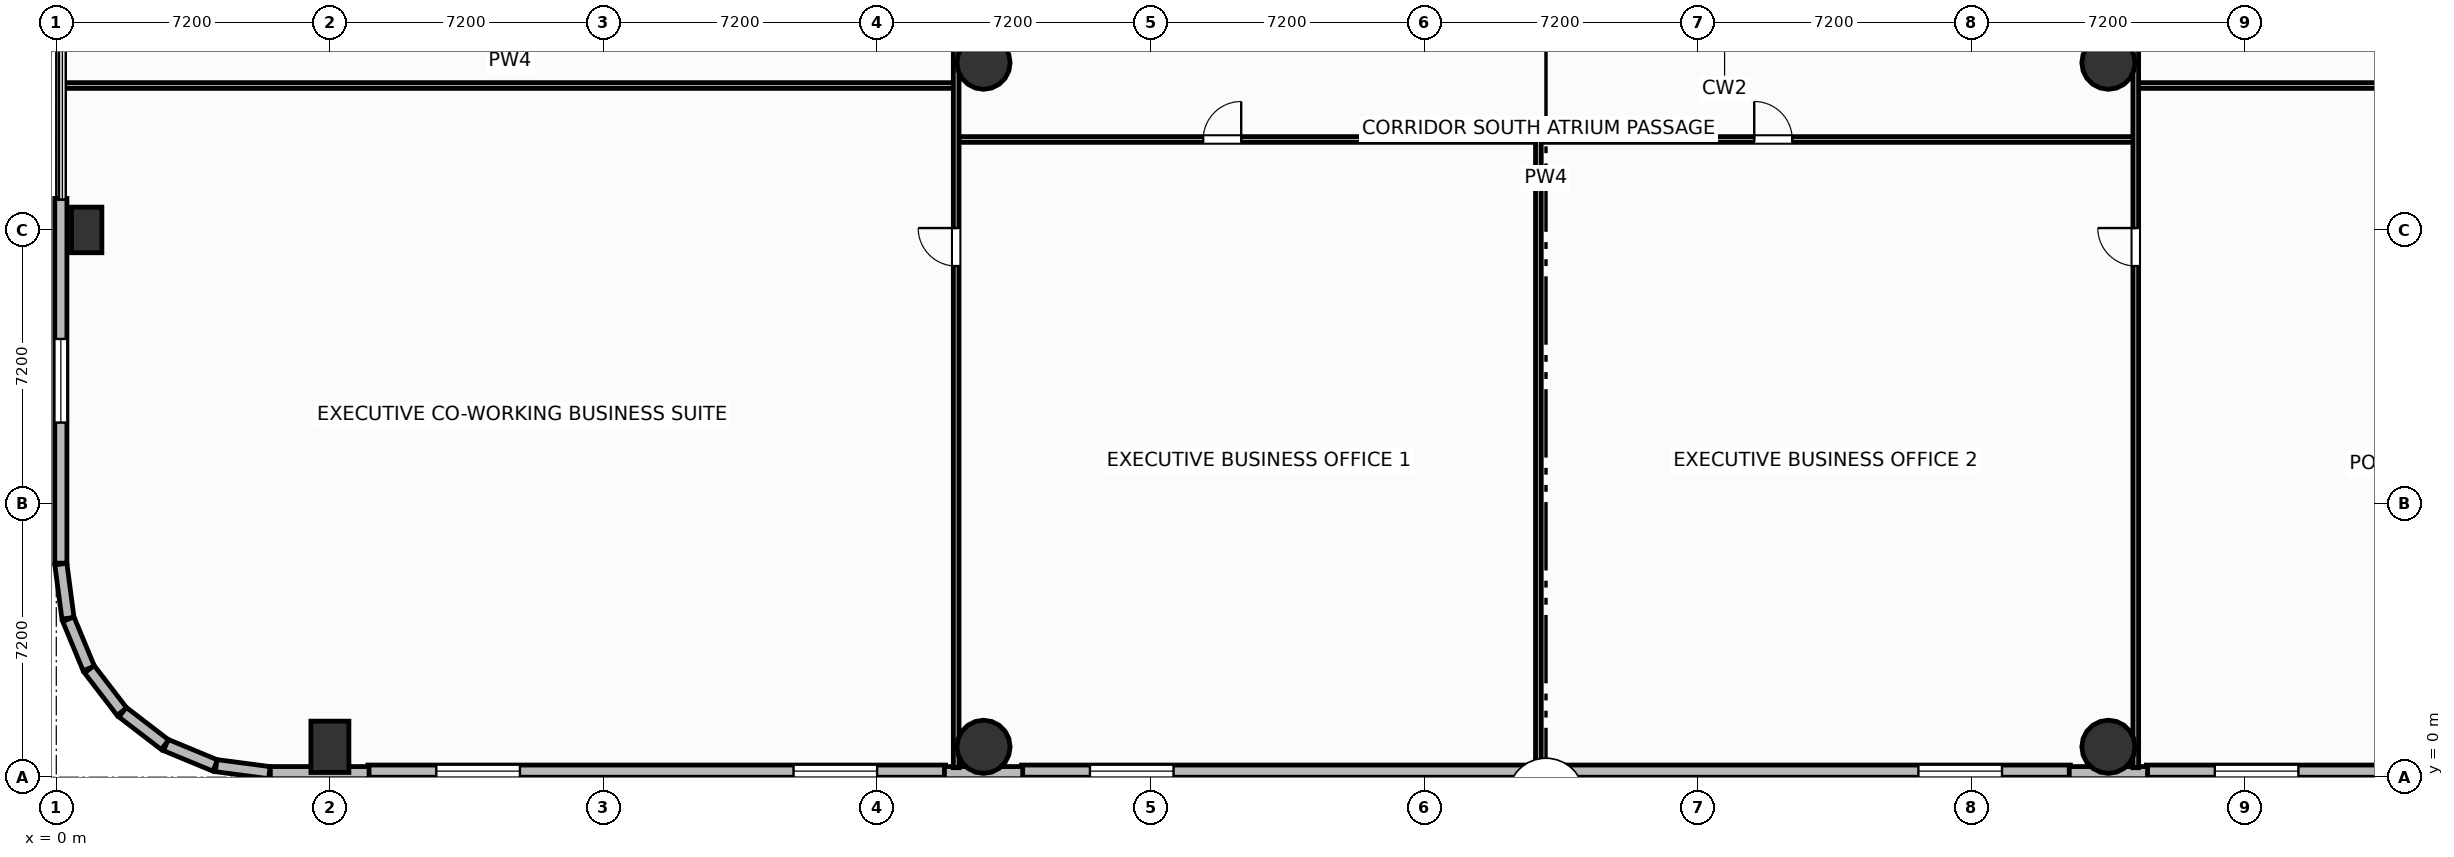
"""IFC4 building model, lengths in metres.
Left out: names, types, materials, properties, quantities, classifications, styles, units other than length and angle.
Written with IfcOpenShell. Run it as: python <this file> out.ifc"""

import sys

from ifc_helpers import new_model, si_unit, direction, frame, frame_2d, origin, origin_2d, place, context, subcontext, project, spatial, rectangle, circle, extrude, element, fill, save


model = new_model("IFC4")
c1 = context("Model", 3, precision=1e-05, world=origin(), true_north=direction((0.0, 1.0)))
c2 = subcontext(c1, "Body", "Model", "MODEL_VIEW")
j1 = project(units=[si_unit("LENGTHUNIT", "METRE"), si_unit("PLANEANGLEUNIT", "RADIAN")], contexts=[c1])
p1 = place(None, origin())
s1 = spatial("IfcSite", under=j1, at=p1, CompositionType="ELEMENT")
p2 = place(p1, origin())
s2 = spatial("IfcBuilding", under=s1, at=p2, CompositionType="ELEMENT")
p3 = place(p2, frame((0.0, 0.0, 21.6)))
s3 = spatial("IfcBuildingStorey", under=s2, at=p3, CompositionType="ELEMENT", Elevation=21.6)
p4 = place(p3, frame((7.2, 0.8, 0.0), z_axis=(0.0, 0.0, 1.0), x_axis=(1.0, 0.0, 0.0)))
e1 = element("IfcColumn", 1, at=p4, inside=s3, PredefinedType="COLUMN", context=c2, shape_type="SweptSolid", body=[
    extrude(rectangle(XDim=1.0, YDim=1.35, at=origin_2d()), origin(), (0.0, 0.0, 1.0), 5.4),
])
for number, where, z_axis, x_axis in (
    (2, (24.4, 0.8, 0.0), (0.0, 0.0, 1.0), (1.0, 0.0, 0.0)),
    (3, (54.0, 0.8, 0.0), (0.0, 0.0, 1.0), (1.0, 0.0, 0.0)),
    (4, (24.4, 18.8, 0.0), (0.0, 0.0, 1.0), (1.0, 0.0, 0.0)),
    (5, (54.0, 18.8, 0.0), (0.0, 0.0, 1.0), (1.0, 0.0, 0.0)),
):
    element("IfcColumn", number, at=place(p3, frame(where, z_axis=z_axis, x_axis=x_axis)), inside=s3, PredefinedType="COLUMN", context=c2, shape_type="SweptSolid", body=[
        extrude(circle(Radius=0.7, at=origin_2d()), origin(), (0.0, 0.0, 1.0), 5.4),
    ])
p5 = place(p3, frame((0.8, 14.4, 0.0), z_axis=(0.0, 0.0, 1.0), x_axis=(1.0, 0.0, 0.0)))
e6 = element("IfcColumn", 6, at=p5, inside=s3, PredefinedType="PILASTER", context=c2, shape_type="SweptSolid", body=[
    extrude(rectangle(XDim=0.8, YDim=1.2, at=origin_2d()), origin(), (0.0, 0.0, 1.0), 5.4),
])
p6 = place(p3, frame((23.4, 0.16, 0.0), z_axis=(0.0, 0.0, 1.0), x_axis=(-1.0, 0.0, 0.0)))
e7 = element("IfcWall", 7, at=p6, inside=s3, PredefinedType="SOLIDWALL", context=c2, shape_type="SweptSolid", body=[
    extrude(rectangle(XDim=15.2, YDim=0.32, at=frame_2d((7.6, 0.0))), origin(), (0.0, 0.0, 1.0), 4.1),
])
p7 = place(p6, frame((1.8, 0.0, 0.8)))
e8 = element("IfcOpeningElement", 8, at=p7, cuts=e7, PredefinedType="OPENING", context=c2, shape_type="SweptSolid", body=[
    extrude(rectangle(XDim=2.2, YDim=1.11, at=frame_2d((1.1, 0.555))), frame((0.0, 0.17, 0.0), z_axis=(0.0, -1.0, 0.0), x_axis=(1.0, 0.0, 0.0)), (0.0, 0.0, 1.0), 0.34),
])
p8 = place(p6, frame((11.2, 0.0, 0.8)))
e9 = element("IfcOpeningElement", 9, at=p8, cuts=e7, PredefinedType="OPENING", context=c2, shape_type="SweptSolid", body=[
    extrude(rectangle(XDim=2.2, YDim=1.11, at=frame_2d((1.1, 0.555))), frame((0.0, 0.17, 0.0), z_axis=(0.0, -1.0, 0.0), x_axis=(1.0, 0.0, 0.0)), (0.0, 0.0, 1.0), 0.34),
])
p9 = place(p3, frame((53.0, 0.16, 0.0), z_axis=(0.0, 0.0, 1.0), x_axis=(-1.0, 0.0, 0.0)))
e10 = element("IfcWall", 10, at=p9, inside=s3, PredefinedType="SOLIDWALL", context=c2, shape_type="SweptSolid", body=[
    extrude(rectangle(XDim=27.6, YDim=0.32, at=frame_2d((13.8, 0.0))), origin(), (0.0, 0.0, 1.0), 4.1),
])
p10 = place(p9, frame((1.8, 0.0, 0.8)))
e11 = element("IfcOpeningElement", 11, at=p10, cuts=e10, PredefinedType="OPENING", context=c2, shape_type="SweptSolid", body=[
    extrude(rectangle(XDim=2.2, YDim=1.11, at=frame_2d((1.1, 0.555))), frame((0.0, 0.17, 0.0), z_axis=(0.0, -1.0, 0.0), x_axis=(1.0, 0.0, 0.0)), (0.0, 0.0, 1.0), 0.34),
])
p11 = place(p9, frame((23.6, 0.0, 0.8)))
e12 = element("IfcOpeningElement", 12, at=p11, cuts=e10, PredefinedType="OPENING", context=c2, shape_type="SweptSolid", body=[
    extrude(rectangle(XDim=2.2, YDim=1.11, at=frame_2d((1.1, 0.555))), frame((0.0, 0.17, 0.0), z_axis=(0.0, -1.0, 0.0), x_axis=(1.0, 0.0, 0.0)), (0.0, 0.0, 1.0), 0.34),
])
p12 = place(p3, frame((70.2, 0.16, 0.0), z_axis=(0.0, 0.0, 1.0), x_axis=(-1.0, 0.0, 0.0)))
e13 = element("IfcWall", 13, at=p12, inside=s3, PredefinedType="SOLIDWALL", context=c2, shape_type="SweptSolid", body=[
    extrude(rectangle(XDim=15.2, YDim=0.32, at=frame_2d((7.6, 0.0))), origin(), (0.0, 0.0, 1.0), 4.1),
])
p13 = place(p12, frame((1.8, 0.0, 0.8)))
e14 = element("IfcOpeningElement", 14, at=p13, cuts=e13, PredefinedType="OPENING", context=c2, shape_type="SweptSolid", body=[
    extrude(rectangle(XDim=2.2, YDim=1.11, at=frame_2d((1.1, 0.555))), frame((0.0, 0.17, 0.0), z_axis=(0.0, -1.0, 0.0), x_axis=(1.0, 0.0, 0.0)), (0.0, 0.0, 1.0), 0.34),
])
p14 = place(p12, frame((11.2, 0.0, 0.8)))
e15 = element("IfcOpeningElement", 15, at=p14, cuts=e13, PredefinedType="OPENING", context=c2, shape_type="SweptSolid", body=[
    extrude(rectangle(XDim=2.2, YDim=1.11, at=frame_2d((1.1, 0.555))), frame((0.0, 0.17, 0.0), z_axis=(0.0, -1.0, 0.0), x_axis=(1.0, 0.0, 0.0)), (0.0, 0.0, 1.0), 0.34),
])
p15 = place(p3, frame((0.12, 5.608, 0.0), z_axis=(0.0, 0.0, 1.0), x_axis=(0.130362303307, -0.991466423978, 0.0)))
e16 = element("IfcWall", 16, at=p15, inside=s3, PredefinedType="SOLIDWALL", context=c2, shape_type="SweptSolid", body=[
    extrude(rectangle(XDim=1.438, YDim=0.32, at=frame_2d((0.719, 0.0))), origin(), (0.0, 0.0, 1.0), 4.1),
])
p16 = place(p3, frame((0.317, 4.159, 0.0), z_axis=(0.0, 0.0, 1.0), x_axis=(0.382628033724, -0.923902477434, 0.0)))
e17 = element("IfcWall", 17, at=p16, inside=s3, PredefinedType="SOLIDWALL", context=c2, shape_type="SweptSolid", body=[
    extrude(rectangle(XDim=1.405, YDim=0.32, at=frame_2d((0.703, 0.0))), origin(), (0.0, 0.0, 1.0), 4.1),
])
p17 = place(p3, frame((0.87, 2.841, 0.0), z_axis=(0.0, 0.0, 1.0), x_axis=(0.60871962085, -0.79338541907, 0.0)))
e18 = element("IfcWall", 18, at=p17, inside=s3, PredefinedType="SOLIDWALL", context=c2, shape_type="SweptSolid", body=[
    extrude(rectangle(XDim=1.405, YDim=0.32, at=frame_2d((0.703, 0.0))), origin(), (0.0, 0.0, 1.0), 4.1),
])
for number, where, z_axis, x_axis in (
    (19, (1.746, 1.711, 0.0), (0.0, 0.0, 1.0), (0.793, -0.609, 0.0)),
    (20, (2.884, 0.846, 0.0), (0.0, 0.0, 1.0), (0.924, -0.383, 0.0)),
):
    element("IfcWall", number, at=place(p3, frame(where, z_axis=z_axis, x_axis=x_axis)), inside=s3, PredefinedType="SOLIDWALL", context=c2, shape_type="SweptSolid", body=[
        extrude(rectangle(XDim=1.406, YDim=0.32, at=frame_2d((0.703, 0.0))), origin(), (0.0, 0.0, 1.0), 4.1),
    ])
p18 = place(p3, frame((4.207, 0.304, 0.0), z_axis=(0.0, 0.0, 1.0), x_axis=(0.991457235349, -0.130432168094, 0.0)))
e21 = element("IfcWall", 21, at=p18, inside=s3, PredefinedType="SOLIDWALL", context=c2, shape_type="SweptSolid", body=[
    extrude(rectangle(XDim=1.413, YDim=0.32, at=frame_2d((0.707, 0.0))), origin(), (0.0, 0.0, 1.0), 4.1),
])
p19 = place(p3, frame((5.633, 0.12, 0.0), z_axis=(0.0, 0.0, 1.0), x_axis=(1.0, 0.0, 0.0)))
e22 = element("IfcWall", 22, at=p19, inside=s3, PredefinedType="SOLIDWALL", context=c2, shape_type="SweptSolid", body=[
    extrude(rectangle(XDim=2.597, YDim=0.32, at=frame_2d((1.299, 0.0))), origin(), (0.0, 0.0, 1.0), 4.1),
])
p20 = place(p3, frame((23.37, 0.12, 0.0), z_axis=(0.0, 0.0, 1.0), x_axis=(1.0, 0.0, 0.0)))
e23 = element("IfcWall", 23, at=p20, inside=s3, PredefinedType="SOLIDWALL", context=c2, shape_type="SweptSolid", body=[
    extrude(rectangle(XDim=2.06, YDim=0.32, at=frame_2d((1.03, 0.0))), origin(), (0.0, 0.0, 1.0), 4.1),
])
p21 = place(p3, frame((52.97, 0.12, 0.0), z_axis=(0.0, 0.0, 1.0), x_axis=(1.0, 0.0, 0.0)))
e24 = element("IfcWall", 24, at=p21, inside=s3, PredefinedType="SOLIDWALL", context=c2, shape_type="SweptSolid", body=[
    extrude(rectangle(XDim=2.06, YDim=0.32, at=frame_2d((1.03, 0.0))), origin(), (0.0, 0.0, 1.0), 4.1),
])
p22 = place(p3, frame((0.12, 15.23, 0.0), z_axis=(0.0, 0.0, 1.0), x_axis=(0.0, -1.0, 0.0)))
e25 = element("IfcWall", 25, at=p22, inside=s3, PredefinedType="SOLIDWALL", context=c2, shape_type="SweptSolid", body=[
    extrude(rectangle(XDim=9.597, YDim=0.32, at=frame_2d((4.799, 0.0))), origin(), (0.0, 0.0, 1.0), 4.1),
])
p23 = place(p22, frame((3.698, 0.0, 0.8)))
e26 = element("IfcOpeningElement", 26, at=p23, cuts=e25, PredefinedType="OPENING", context=c2, shape_type="SweptSolid", body=[
    extrude(rectangle(XDim=2.2, YDim=2.0, at=frame_2d((1.1, 1.0))), frame((0.0, 0.17, 0.0), z_axis=(0.0, -1.0, 0.0), x_axis=(1.0, 0.0, 0.0)), (0.0, 0.0, 1.0), 0.34),
])
for number, where, z_axis, x_axis in (
    (27, (0.2, 18.2, 0.0), (0.0, 0.0, 1.0), (1.0, 0.0, 0.0)),
    (28, (54.72, 18.2, 0.0), (0.0, 0.0, 1.0), (1.0, 0.0, 0.0)),
):
    element("IfcWall", number, at=place(p3, frame(where, z_axis=z_axis, x_axis=x_axis)), inside=s3, PredefinedType="PARTITIONING", context=c2, shape_type="SweptSolid", body=[
        extrude(rectangle(XDim=23.48, YDim=0.15, at=frame_2d((11.74, 0.0))), origin(), (0.0, 0.0, 1.0), 1.935),
    ])
p24 = place(p3, frame((23.68, 16.78, 0.0), z_axis=(0.0, 0.0, 1.0), x_axis=(1.0, 0.0, 0.0)))
e29 = element("IfcWall", 29, at=p24, inside=s3, PredefinedType="PARTITIONING", context=c2, shape_type="SweptSolid", body=[
    extrude(rectangle(XDim=31.04, YDim=0.15, at=frame_2d((15.52, 0.0))), origin(), (0.0, 0.0, 1.0), 5.15),
])
p25 = place(p24, frame((6.5, 0.0, 0.0)))
e30 = element("IfcOpeningElement", 30, at=p25, cuts=e29, PredefinedType="OPENING", context=c2, shape_type="SweptSolid", body=[
    extrude(rectangle(XDim=1.0, YDim=2.05, at=frame_2d((0.5, 1.025))), frame((0.0, 0.085, 0.0), z_axis=(0.0, -1.0, 0.0), x_axis=(1.0, 0.0, 0.0)), (0.0, 0.0, 1.0), 0.17),
])
p26 = place(p24, frame((21.0, 0.0, 0.0)))
e31 = element("IfcOpeningElement", 31, at=p26, cuts=e29, PredefinedType="OPENING", context=c2, shape_type="SweptSolid", body=[
    extrude(rectangle(XDim=1.0, YDim=2.05, at=frame_2d((0.5, 1.025))), frame((0.0, 0.085, 0.0), z_axis=(0.0, -1.0, 0.0), x_axis=(1.0, 0.0, 0.0)), (0.0, 0.0, 1.0), 0.17),
])
p27 = place(p3, frame((39.0, 0.25, 0.0), z_axis=(0.0, 0.0, 1.0), x_axis=(0.0, 1.0, 0.0)))
e32 = element("IfcWall", 32, at=p27, inside=s3, PredefinedType="PARTITIONING", context=c2, shape_type="SweptSolid", body=[
    extrude(rectangle(XDim=16.53, YDim=0.15, at=frame_2d((8.265, 0.0))), origin(), (0.0, 0.0, 1.0), 5.15),
])
p28 = place(p3, frame((23.68, 0.25, 0.0), z_axis=(0.0, 0.0, 1.0), x_axis=(0.0, 1.0, 0.0)))
e33 = element("IfcWall", 33, at=p28, inside=s3, PredefinedType="PARTITIONING", context=c2, shape_type="SweptSolid", body=[
    extrude(rectangle(XDim=26.37, YDim=0.15, at=frame_2d((13.185, 0.0))), origin(), (0.0, 0.0, 1.0), 5.15),
])
p29 = place(p28, frame((21.5, 0.0, 0.0)))
e34 = element("IfcOpeningElement", 34, at=p29, cuts=e33, PredefinedType="OPENING", context=c2, shape_type="SweptSolid", body=[
    extrude(rectangle(XDim=1.0, YDim=2.05, at=frame_2d((0.5, 1.025))), frame((0.0, 0.085, 0.0), z_axis=(0.0, -1.0, 0.0), x_axis=(1.0, 0.0, 0.0)), (0.0, 0.0, 1.0), 0.17),
])
p30 = place(p28, frame((13.2, 0.0, 0.0)))
e35 = element("IfcOpeningElement", 35, at=p30, cuts=e33, PredefinedType="OPENING", context=c2, shape_type="SweptSolid", body=[
    extrude(rectangle(XDim=1.0, YDim=2.05, at=frame_2d((0.5, 1.025))), frame((0.0, 0.085, 0.0), z_axis=(0.0, -1.0, 0.0), x_axis=(1.0, 0.0, 0.0)), (0.0, 0.0, 1.0), 0.17),
])
p31 = place(p3, frame((54.72, 0.25, 0.0), z_axis=(0.0, 0.0, 1.0), x_axis=(0.0, 1.0, 0.0)))
e36 = element("IfcWall", 36, at=p31, inside=s3, PredefinedType="PARTITIONING", context=c2, shape_type="SweptSolid", body=[
    extrude(rectangle(XDim=26.37, YDim=0.15, at=frame_2d((13.185, 0.0))), origin(), (0.0, 0.0, 1.0), 5.15),
])
p32 = place(p31, frame((21.5, 0.0, 0.0)))
e37 = element("IfcOpeningElement", 37, at=p32, cuts=e36, PredefinedType="OPENING", context=c2, shape_type="SweptSolid", body=[
    extrude(rectangle(XDim=1.0, YDim=2.05, at=frame_2d((0.5, 1.025))), frame((0.0, 0.085, 0.0), z_axis=(0.0, -1.0, 0.0), x_axis=(1.0, 0.0, 0.0)), (0.0, 0.0, 1.0), 0.17),
])
p33 = place(p31, frame((13.2, 0.0, 0.0)))
e38 = element("IfcOpeningElement", 38, at=p33, cuts=e36, PredefinedType="OPENING", context=c2, shape_type="SweptSolid", body=[
    extrude(rectangle(XDim=1.0, YDim=2.05, at=frame_2d((0.5, 1.025))), frame((0.0, 0.085, 0.0), z_axis=(0.0, -1.0, 0.0), x_axis=(1.0, 0.0, 0.0)), (0.0, 0.0, 1.0), 0.17),
])
p34 = place(p7, origin())
e39 = element("IfcWindow", 39, at=p34, inside=s3, PartitioningType="SINGLE_PANEL", PredefinedType="WINDOW", context=c2, shape_type="SweptSolid", body=[
    extrude(rectangle(XDim=2.2, YDim=1.11, at=frame_2d((1.1, 0.555))), frame((0.0, 0.03, 0.0), z_axis=(0.0, -1.0, 0.0), x_axis=(1.0, 0.0, 0.0)), (0.0, 0.0, 1.0), 0.06),
])
fill(e8, e39)
p35 = place(p8, origin())
e40 = element("IfcWindow", 40, at=p35, inside=s3, PartitioningType="SINGLE_PANEL", PredefinedType="WINDOW", context=c2, shape_type="SweptSolid", body=[
    extrude(rectangle(XDim=2.2, YDim=1.11, at=frame_2d((1.1, 0.555))), frame((0.0, 0.03, 0.0), z_axis=(0.0, -1.0, 0.0), x_axis=(1.0, 0.0, 0.0)), (0.0, 0.0, 1.0), 0.06),
])
fill(e9, e40)
p36 = place(p10, origin())
e41 = element("IfcWindow", 41, at=p36, inside=s3, PartitioningType="SINGLE_PANEL", PredefinedType="WINDOW", context=c2, shape_type="SweptSolid", body=[
    extrude(rectangle(XDim=2.2, YDim=1.11, at=frame_2d((1.1, 0.555))), frame((0.0, 0.03, 0.0), z_axis=(0.0, -1.0, 0.0), x_axis=(1.0, 0.0, 0.0)), (0.0, 0.0, 1.0), 0.06),
])
fill(e11, e41)
p37 = place(p11, origin())
e42 = element("IfcWindow", 42, at=p37, inside=s3, PartitioningType="SINGLE_PANEL", PredefinedType="WINDOW", context=c2, shape_type="SweptSolid", body=[
    extrude(rectangle(XDim=2.2, YDim=1.11, at=frame_2d((1.1, 0.555))), frame((0.0, 0.03, 0.0), z_axis=(0.0, -1.0, 0.0), x_axis=(1.0, 0.0, 0.0)), (0.0, 0.0, 1.0), 0.06),
])
fill(e12, e42)
p38 = place(p14, origin())
e43 = element("IfcWindow", 43, at=p38, inside=s3, PartitioningType="SINGLE_PANEL", PredefinedType="WINDOW", context=c2, shape_type="SweptSolid", body=[
    extrude(rectangle(XDim=2.2, YDim=1.11, at=frame_2d((1.1, 0.555))), frame((0.0, 0.03, 0.0), z_axis=(0.0, -1.0, 0.0), x_axis=(1.0, 0.0, 0.0)), (0.0, 0.0, 1.0), 0.06),
])
fill(e15, e43)
p39 = place(p23, origin())
e44 = element("IfcWindow", 44, at=p39, inside=s3, PartitioningType="SINGLE_PANEL", PredefinedType="WINDOW", context=c2, shape_type="SweptSolid", body=[
    extrude(rectangle(XDim=2.2, YDim=2.0, at=frame_2d((1.1, 1.0))), frame((0.0, 0.03, 0.0), z_axis=(0.0, -1.0, 0.0), x_axis=(1.0, 0.0, 0.0)), (0.0, 0.0, 1.0), 0.06),
])
fill(e26, e44)
p40 = place(p25, origin())
e45 = element("IfcDoor", 45, at=p40, inside=s3, OperationType="SINGLE_SWING_RIGHT", PredefinedType="DOOR", context=c2, shape_type="SweptSolid", body=[
    extrude(rectangle(XDim=1.0, YDim=2.05, at=frame_2d((0.5, 1.025))), frame((0.0, 0.025, 0.0), z_axis=(0.0, -1.0, 0.0), x_axis=(1.0, 0.0, 0.0)), (0.0, 0.0, 1.0), 0.05),
])
fill(e30, e45)
p41 = place(p26, origin())
e46 = element("IfcDoor", 46, at=p41, inside=s3, OperationType="SINGLE_SWING_LEFT", PredefinedType="DOOR", context=c2, shape_type="SweptSolid", body=[
    extrude(rectangle(XDim=1.0, YDim=2.05, at=frame_2d((0.5, 1.025))), frame((0.0, 0.025, 0.0), z_axis=(0.0, -1.0, 0.0), x_axis=(1.0, 0.0, 0.0)), (0.0, 0.0, 1.0), 0.05),
])
fill(e31, e46)
p42 = place(p30, origin())
e47 = element("IfcDoor", 47, at=p42, inside=s3, OperationType="SINGLE_SWING_RIGHT", PredefinedType="DOOR", context=c2, shape_type="SweptSolid", body=[
    extrude(rectangle(XDim=1.0, YDim=2.05, at=frame_2d((0.5, 1.025))), frame((0.0, 0.025, 0.0), z_axis=(0.0, -1.0, 0.0), x_axis=(1.0, 0.0, 0.0)), (0.0, 0.0, 1.0), 0.05),
])
fill(e35, e47)
p43 = place(p33, origin())
e48 = element("IfcDoor", 48, at=p43, inside=s3, OperationType="SINGLE_SWING_RIGHT", PredefinedType="DOOR", context=c2, shape_type="SweptSolid", body=[
    extrude(rectangle(XDim=1.0, YDim=2.05, at=frame_2d((0.5, 1.025))), frame((0.0, 0.025, 0.0), z_axis=(0.0, -1.0, 0.0), x_axis=(1.0, 0.0, 0.0)), (0.0, 0.0, 1.0), 0.05),
])
fill(e38, e48)
save(model, sys.argv[1])
